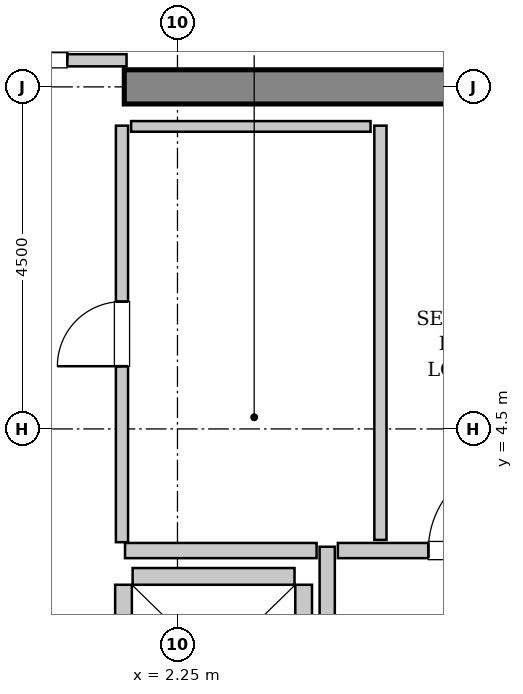
"""IFC4 building model, lengths in metres.
Left out: names, types, materials, properties, quantities, classifications, styles, units other than length and angle.
Written with IfcOpenShell. Run it as: python <this file> out.ifc"""

import sys

from ifc_helpers import new_model, si_unit, direction, frame, frame_2d, origin, place, context, subcontext, project, spatial, rectangle, extrude, source, transform, mapped, element, fill, save


model = new_model("IFC4")
c1 = context("Model", 3, precision=1e-05, world=origin(), true_north=direction((0.0, 1.0)))
c2 = subcontext(c1, "Body", "Model", "MODEL_VIEW")
j1 = project(units=[si_unit("LENGTHUNIT", "METRE"), si_unit("PLANEANGLEUNIT", "RADIAN")], contexts=[c1])
p1 = place(None, origin())
s1 = spatial("IfcSite", under=j1, at=p1, CompositionType="ELEMENT")
p2 = place(p1, origin())
s2 = spatial("IfcBuilding", under=s1, at=p2, CompositionType="ELEMENT")
p3 = place(p2, frame((0.0, 0.0, 229.4)))
s3 = spatial("IfcBuildingStorey", under=s2, at=p3, CompositionType="ELEMENT", Elevation=229.4)
m1 = source(origin(), c2, "Body", "SweptSolid", [
    extrude(rectangle(XDim=9.925, YDim=0.45, at=frame_2d((4.962, 0.0))), origin(), (0.0, 0.0, 1.0), 3.8),
])
p4 = place(p3, frame((1.55, 9.0, 0.0), z_axis=(0.0, 0.0, 1.0), x_axis=(1.0, 0.0, 0.0)))
e1 = element("IfcWall", 1, at=p4, inside=s3, PredefinedType="SHEAR", context=c2, shape_type="MappedRepresentation", body=[
    mapped(m1, transform((0.0, 0.0, 0.0), x_axis=(1.0, 0.0, 0.0), y_axis=(0.0, 1.0, 0.0), z_axis=(0.0, 0.0, 1.0), scale=1.0)),
])
m2 = source(origin(), c2, "Body", "SweptSolid", [
    extrude(rectangle(XDim=4.9, YDim=0.22, at=frame_2d((2.45, 0.0))), origin(), (0.0, 0.0, 1.0), 3.535),
])
for number, where, z_axis, x_axis in (
    (2, (1.54, 2.45, 0.0), (0.0, 0.0, 1.0), (0.0, -1.0, 0.0)),
    (3, (3.91, -2.45, 0.0), (0.0, 0.0, 1.0), (0.0, 1.0, 0.0)),
):
    element("IfcWall", number, at=place(p3, frame(where, z_axis=z_axis, x_axis=x_axis)), inside=s3, PredefinedType="SOLIDWALL", context=c2, shape_type="MappedRepresentation", body=[
        mapped(m2, transform((0.0, 0.0, 0.0), x_axis=(1.0, 0.0, 0.0), y_axis=(0.0, 1.0, 0.0), z_axis=(0.0, 0.0, 1.0), scale=1.0)),
    ])
m3 = source(origin(), c2, "Body", "SweptSolid", [
    extrude(rectangle(XDim=2.13, YDim=0.22, at=frame_2d((1.065, 0.0))), origin(), (0.0, 0.0, 1.0), 3.535),
])
p5 = place(p3, frame((3.79, 2.56, 0.0), z_axis=(0.0, 0.0, 1.0), x_axis=(-1.0, 0.0, 0.0)))
e4 = element("IfcWall", 4, at=p5, inside=s3, PredefinedType="SOLIDWALL", context=c2, shape_type="MappedRepresentation", body=[
    mapped(m3, transform((0.0, 0.0, 0.0), x_axis=(1.0, 0.0, 0.0), y_axis=(0.0, 1.0, 0.0), z_axis=(0.0, 0.0, 1.0), scale=1.0)),
])
m4 = source(origin(), c2, "Body", "SweptSolid", [
    extrude(rectangle(XDim=5.9, YDim=0.2, at=frame_2d((2.95, 0.0))), origin(), (0.0, 0.0, 1.0), 3.535),
])
p6 = place(p3, frame((4.22, -2.95, 0.0), z_axis=(0.0, 0.0, 1.0), x_axis=(0.0, 1.0, 0.0)))
e5 = element("IfcWall", 5, at=p6, inside=s3, PredefinedType="PARTITIONING", context=c2, shape_type="MappedRepresentation", body=[
    mapped(m4, transform((0.0, 0.0, 0.0), x_axis=(1.0, 0.0, 0.0), y_axis=(0.0, 1.0, 0.0), z_axis=(0.0, 0.0, 1.0), scale=1.0)),
])
m5 = source(origin(), c2, "Body", "SweptSolid", [
    extrude(rectangle(XDim=2.52, YDim=0.2, at=frame_2d((1.26, 0.0))), origin(), (0.0, 0.0, 1.0), 3.535),
])
p7 = place(p3, frame((1.56, 2.9, 0.0), z_axis=(0.0, 0.0, 1.0), x_axis=(1.0, 0.0, 0.0)))
e6 = element("IfcWall", 6, at=p7, inside=s3, PredefinedType="PARTITIONING", context=c2, shape_type="MappedRepresentation", body=[
    mapped(m5, transform((0.0, 0.0, 0.0), x_axis=(1.0, 0.0, 0.0), y_axis=(0.0, 1.0, 0.0), z_axis=(0.0, 0.0, 1.0), scale=1.0)),
])
m6 = source(origin(), c2, "Body", "SweptSolid", [
    extrude(rectangle(XDim=3.04, YDim=0.2, at=frame_2d((1.52, 0.0))), origin(), (0.0, 0.0, 1.0), 3.535),
])
p8 = place(p3, frame((4.36, 2.9, 0.0), z_axis=(0.0, 0.0, 1.0), x_axis=(1.0, 0.0, 0.0)))
e7 = element("IfcWall", 7, at=p8, inside=s3, PredefinedType="PARTITIONING", context=c2, shape_type="MappedRepresentation", body=[
    mapped(m6, transform((0.0, 0.0, 0.0), x_axis=(1.0, 0.0, 0.0), y_axis=(0.0, 1.0, 0.0), z_axis=(0.0, 0.0, 1.0), scale=1.0)),
])
p9 = place(p8, frame((1.19, 0.0, 0.0)))
e8 = element("IfcOpeningElement", 8, at=p9, cuts=e7, PredefinedType="OPENING", context=c2, shape_type="SweptSolid", body=[
    extrude(rectangle(XDim=1.2, YDim=2.15, at=frame_2d((0.6, 1.075))), frame((0.0, 0.11, 0.0), z_axis=(0.0, -1.0, 0.0), x_axis=(1.0, 0.0, 0.0)), (0.0, 0.0, 1.0), 0.22),
])
m7 = source(origin(), c2, "Body", "SweptSolid", [
    extrude(rectangle(XDim=3.16, YDim=0.16, at=frame_2d((1.58, 0.0))), origin(), (0.0, 0.0, 1.0), 2.625),
])
p10 = place(p3, frame((-1.58, 9.35, 0.0), z_axis=(0.0, 0.0, 1.0), x_axis=(1.0, 0.0, 0.0)))
e9 = element("IfcWall", 9, at=p10, inside=s3, PredefinedType="PARTITIONING", context=c2, shape_type="MappedRepresentation", body=[
    mapped(m7, transform((0.0, 0.0, 0.0), x_axis=(1.0, 0.0, 0.0), y_axis=(0.0, 1.0, 0.0), z_axis=(0.0, 0.0, 1.0), scale=1.0)),
])
p11 = place(p10, frame((0.78, 0.0, 0.0)))
e10 = element("IfcOpeningElement", 10, at=p11, cuts=e9, PredefinedType="OPENING", context=c2, shape_type="SweptSolid", body=[
    extrude(rectangle(XDim=1.6, YDim=2.3, at=frame_2d((0.8, 1.15))), frame((0.0, 0.09, 0.0), z_axis=(0.0, -1.0, 0.0), x_axis=(1.0, 0.0, 0.0)), (0.0, 0.0, 1.0), 0.18),
])
m8 = source(origin(), c2, "Body", "SweptSolid", [
    extrude(rectangle(XDim=5.45, YDim=0.16, at=frame_2d((2.725, 0.0))), origin(), (0.0, 0.0, 1.0), 3.535),
])
p12 = place(p3, frame((4.92, 3.04, 0.0), z_axis=(0.0, 0.0, 1.0), x_axis=(0.0, 1.0, 0.0)))
e11 = element("IfcWall", 11, at=p12, inside=s3, PredefinedType="PARTITIONING", context=c2, shape_type="MappedRepresentation", body=[
    mapped(m8, transform((0.0, 0.0, 0.0), x_axis=(1.0, 0.0, 0.0), y_axis=(0.0, 1.0, 0.0), z_axis=(0.0, 0.0, 1.0), scale=1.0)),
])
m9 = source(origin(), c2, "Body", "SweptSolid", [
    extrude(rectangle(XDim=5.48, YDim=0.16, at=frame_2d((2.74, 0.0))), origin(), (0.0, 0.0, 1.0), 3.535),
])
p13 = place(p3, frame((1.52, 3.01, 0.0), z_axis=(0.0, 0.0, 1.0), x_axis=(0.0, 1.0, 0.0)))
e12 = element("IfcWall", 12, at=p13, inside=s3, PredefinedType="PARTITIONING", context=c2, shape_type="MappedRepresentation", body=[
    mapped(m9, transform((0.0, 0.0, 0.0), x_axis=(1.0, 0.0, 0.0), y_axis=(0.0, 1.0, 0.0), z_axis=(0.0, 0.0, 1.0), scale=1.0)),
])
p14 = place(p13, frame((2.315, 0.0, 0.0)))
e13 = element("IfcOpeningElement", 13, at=p14, cuts=e12, PredefinedType="OPENING", context=c2, shape_type="SweptSolid", body=[
    extrude(rectangle(XDim=0.85, YDim=2.1, at=frame_2d((0.425, 1.05))), frame((0.0, 0.09, 0.0), z_axis=(0.0, -1.0, 0.0), x_axis=(1.0, 0.0, 0.0)), (0.0, 0.0, 1.0), 0.18),
])
m10 = source(origin(), c2, "Body", "SweptSolid", [
    extrude(rectangle(XDim=3.15, YDim=0.14, at=frame_2d((1.575, 0.0))), origin(), (0.0, 0.0, 1.0), 3.535),
])
p15 = place(p3, frame((1.64, 8.48, 0.0), z_axis=(0.0, 0.0, 1.0), x_axis=(1.0, 0.0, 0.0)))
e14 = element("IfcWall", 14, at=p15, inside=s3, PredefinedType="PARTITIONING", context=c2, shape_type="MappedRepresentation", body=[
    mapped(m10, transform((0.0, 0.0, 0.0), x_axis=(1.0, 0.0, 0.0), y_axis=(0.0, 1.0, 0.0), z_axis=(0.0, 0.0, 1.0), scale=1.0)),
])
m11 = source(origin(), c2, "Body", "SweptSolid", [
    extrude(rectangle(XDim=1.2, YDim=2.15, at=frame_2d((0.6, 1.075))), frame((0.0, 0.025, 0.0), z_axis=(0.0, -1.0, 0.0), x_axis=(1.0, 0.0, 0.0)), (0.0, 0.0, 1.0), 0.05),
])
p16 = place(p9, origin())
e15 = element("IfcDoor", 15, at=p16, inside=s3, OperationType="SINGLE_SWING_RIGHT", PredefinedType="DOOR", context=c2, shape_type="MappedRepresentation", body=[
    mapped(m11, transform((0.0, 0.0, 0.0), x_axis=(1.0, 0.0, 0.0), y_axis=(0.0, 1.0, 0.0), z_axis=(0.0, 0.0, 1.0), scale=1.0)),
])
fill(e8, e15)
m12 = source(origin(), c2, "Body", "SweptSolid", [
    extrude(rectangle(XDim=1.6, YDim=2.3, at=frame_2d((0.8, 1.15))), frame((0.0, 0.025, 0.0), z_axis=(0.0, -1.0, 0.0), x_axis=(1.0, 0.0, 0.0)), (0.0, 0.0, 1.0), 0.05),
])
p17 = place(p11, origin())
e16 = element("IfcDoor", 16, at=p17, inside=s3, OperationType="DOUBLE_DOOR_SINGLE_SWING", PredefinedType="DOOR", context=c2, shape_type="MappedRepresentation", body=[
    mapped(m12, transform((0.0, 0.0, 0.0), x_axis=(1.0, 0.0, 0.0), y_axis=(0.0, 1.0, 0.0), z_axis=(0.0, 0.0, 1.0), scale=1.0)),
])
fill(e10, e16)
m13 = source(origin(), c2, "Body", "SweptSolid", [
    extrude(rectangle(XDim=0.85, YDim=2.1, at=frame_2d((0.425, 1.05))), frame((0.0, 0.025, 0.0), z_axis=(0.0, -1.0, 0.0), x_axis=(1.0, 0.0, 0.0)), (0.0, 0.0, 1.0), 0.05),
])
p18 = place(p14, origin())
e17 = element("IfcDoor", 17, at=p18, inside=s3, OperationType="SINGLE_SWING_LEFT", PredefinedType="DOOR", context=c2, shape_type="MappedRepresentation", body=[
    mapped(m13, transform((0.0, 0.0, 0.0), x_axis=(1.0, 0.0, 0.0), y_axis=(0.0, 1.0, 0.0), z_axis=(0.0, 0.0, 1.0), scale=1.0)),
])
fill(e13, e17)
save(model, sys.argv[1])
